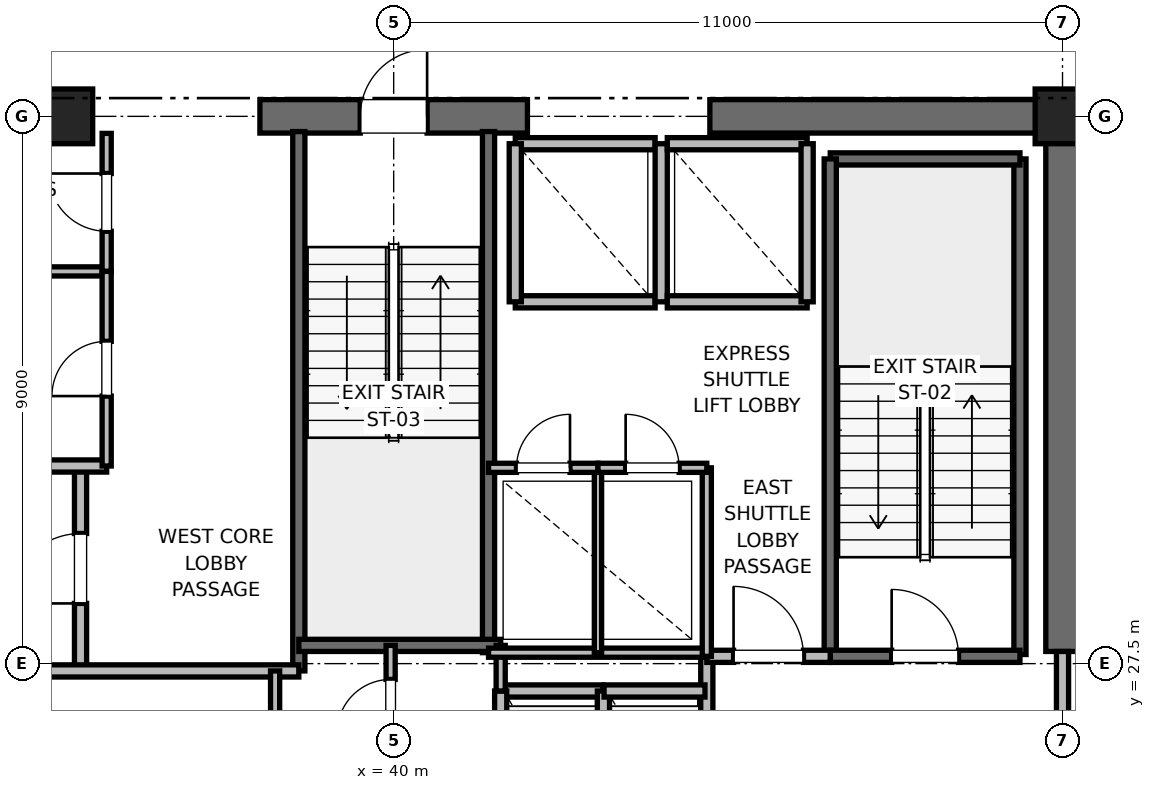
"""IFC4 building model, lengths in metres.
Left out: names, types, materials, properties, quantities, classifications, styles, units other than length and angle.
Written with IfcOpenShell. Run it as: python <this file> out.ifc"""

import sys

from ifc_helpers import new_model, si_unit, direction, frame, frame_2d, origin, origin_2d, place, context, subcontext, project, spatial, rectangle, extrude, element, fill, save


model = new_model("IFC4")
c1 = context("Model", 3, precision=1e-05, world=origin(), true_north=direction((0.0, 1.0)))
c2 = subcontext(c1, "Body", "Model", "MODEL_VIEW")
j1 = project(units=[si_unit("LENGTHUNIT", "METRE"), si_unit("PLANEANGLEUNIT", "RADIAN")], contexts=[c1])
p1 = place(None, origin())
s1 = spatial("IfcSite", under=j1, at=p1, CompositionType="ELEMENT")
p2 = place(p1, origin())
s2 = spatial("IfcBuilding", under=s1, at=p2, CompositionType="ELEMENT")
p3 = place(p2, frame((0.0, 0.0, 217.2)))
s3 = spatial("IfcBuildingStorey", under=s2, at=p3, CompositionType="ELEMENT", Elevation=217.2)
for number, where, z_axis, x_axis in (
    (1, (51.0, 36.5, 0.0), (0.0, 0.0, 1.0), (1.0, 0.0, 0.0)),
    (2, (34.6, 36.5, 0.0), (0.0, 0.0, 1.0), (1.0, 0.0, 0.0)),
):
    element("IfcColumn", number, at=place(p3, frame(where, z_axis=z_axis, x_axis=x_axis)), inside=s3, PredefinedType="PILASTER", context=c2, shape_type="SweptSolid", body=[
        extrude(rectangle(XDim=0.9, YDim=0.9, at=origin_2d()), origin(), (0.0, 0.0, 1.0), 4.0),
    ])
p4 = place(p3, frame((29.0, 36.5, 0.0), z_axis=(0.0, 0.0, 1.0), x_axis=(1.0, 0.0, 0.0)))
e3 = element("IfcWall", 3, at=p4, inside=s3, PredefinedType="SHEAR", context=c2, shape_type="SweptSolid", body=[
    extrude(rectangle(XDim=5.8, YDim=0.55, at=frame_2d((2.9, 0.0))), origin(), (0.0, 0.0, 1.0), 3.775),
])
p5 = place(p3, frame((37.8, 36.5, 0.0), z_axis=(0.0, 0.0, 1.0), x_axis=(1.0, 0.0, 0.0)))
e4 = element("IfcWall", 4, at=p5, inside=s3, PredefinedType="SHEAR", context=c2, shape_type="SweptSolid", body=[
    extrude(rectangle(XDim=4.4, YDim=0.55, at=frame_2d((2.2, 0.0))), origin(), (0.0, 0.0, 1.0), 3.775),
])
p6 = place(p5, frame((1.65, 0.0, 0.0)))
e5 = element("IfcOpeningElement", 5, at=p6, cuts=e4, PredefinedType="OPENING", context=c2, shape_type="SweptSolid", body=[
    extrude(rectangle(XDim=1.1, YDim=2.15, at=frame_2d((0.55, 1.075))), frame((0.0, 0.275, 0.0), z_axis=(0.0, -1.0, 0.0), x_axis=(1.0, 0.0, 0.0)), (0.0, 0.0, 1.0), 0.55),
])
p7 = place(p3, frame((45.2, 36.5, 0.0), z_axis=(0.0, 0.0, 1.0), x_axis=(1.0, 0.0, 0.0)))
e6 = element("IfcWall", 6, at=p7, inside=s3, PredefinedType="SHEAR", context=c2, shape_type="SweptSolid", body=[
    extrude(rectangle(XDim=5.8, YDim=0.55, at=frame_2d((2.9, 0.0))), origin(), (0.0, 0.0, 1.0), 3.775),
])
p8 = place(p3, frame((51.0, 27.7, 0.0), z_axis=(0.0, 0.0, 1.0), x_axis=(0.0, 1.0, 0.0)))
e7 = element("IfcWall", 7, at=p8, inside=s3, PredefinedType="SHEAR", context=c2, shape_type="SweptSolid", body=[
    extrude(rectangle(XDim=8.8, YDim=0.55, at=frame_2d((4.4, 0.0))), origin(), (0.0, 0.0, 1.0), 3.775),
])
p9 = place(p3, frame((50.3, 27.65, 0.0), z_axis=(0.0, 0.0, 1.0), x_axis=(0.0, 1.0, 0.0)))
e8 = element("IfcWall", 8, at=p9, inside=s3, PredefinedType="SOLIDWALL", context=c2, shape_type="SweptSolid", body=[
    extrude(rectangle(XDim=8.15, YDim=0.2, at=frame_2d((4.075, 0.0))), origin(), (0.0, 0.0, 1.0), 3.775),
])
p10 = place(p3, frame((47.18, 35.8, 0.0), z_axis=(0.0, 0.0, 1.0), x_axis=(1.0, 0.0, 0.0)))
e9 = element("IfcWall", 9, at=p10, inside=s3, PredefinedType="SOLIDWALL", context=c2, shape_type="SweptSolid", body=[
    extrude(rectangle(XDim=3.12, YDim=0.2, at=frame_2d((1.56, 0.0))), origin(), (0.0, 0.0, 1.0), 3.775),
])
p11 = place(p3, frame((47.18, 27.62, 0.0), z_axis=(0.0, 0.0, 1.0), x_axis=(0.0, 1.0, 0.0)))
e10 = element("IfcWall", 10, at=p11, inside=s3, PredefinedType="SOLIDWALL", context=c2, shape_type="SweptSolid", body=[
    extrude(rectangle(XDim=8.18, YDim=0.2, at=frame_2d((4.09, 0.0))), origin(), (0.0, 0.0, 1.0), 3.775),
])
p12 = place(p3, frame((47.18, 27.62, 0.0), z_axis=(0.0, 0.0, 1.0), x_axis=(1.0, 0.0, 0.0)))
e11 = element("IfcWall", 11, at=p12, inside=s3, PredefinedType="SOLIDWALL", context=c2, shape_type="SweptSolid", body=[
    extrude(rectangle(XDim=3.12, YDim=0.2, at=frame_2d((1.56, 0.0))), origin(), (0.0, 0.0, 1.0), 3.775),
])
p13 = place(p12, frame((1.01, 0.0, 0.0)))
e12 = element("IfcOpeningElement", 12, at=p13, cuts=e11, PredefinedType="OPENING", context=c2, shape_type="SweptSolid", body=[
    extrude(rectangle(XDim=1.1, YDim=2.15, at=frame_2d((0.55, 1.075))), frame((0.0, 0.1, 0.0), z_axis=(0.0, -1.0, 0.0), x_axis=(1.0, 0.0, 0.0)), (0.0, 0.0, 1.0), 0.2),
])
p14 = place(p3, frame((38.44, 27.38, 0.0), z_axis=(0.0, 0.0, 1.0), x_axis=(0.0, 1.0, 0.0)))
e13 = element("IfcWall", 13, at=p14, inside=s3, PredefinedType="SOLIDWALL", context=c2, shape_type="SweptSolid", body=[
    extrude(rectangle(XDim=8.87, YDim=0.2, at=frame_2d((4.435, 0.0))), origin(), (0.0, 0.0, 1.0), 3.775),
])
p15 = place(p3, frame((41.56, 27.68, 0.0), z_axis=(0.0, 0.0, 1.0), x_axis=(0.0, 1.0, 0.0)))
e14 = element("IfcWall", 14, at=p15, inside=s3, PredefinedType="SOLIDWALL", context=c2, shape_type="SweptSolid", body=[
    extrude(rectangle(XDim=8.57, YDim=0.2, at=frame_2d((4.285, 0.0))), origin(), (0.0, 0.0, 1.0), 3.775),
])
p16 = place(p3, frame((38.44, 27.8, 0.0), z_axis=(0.0, 0.0, 1.0), x_axis=(1.0, 0.0, 0.0)))
e15 = element("IfcWall", 15, at=p16, inside=s3, PredefinedType="SOLIDWALL", context=c2, shape_type="SweptSolid", body=[
    extrude(rectangle(XDim=3.32, YDim=0.2, at=frame_2d((1.66, 0.0))), origin(), (0.0, 0.0, 1.0), 3.775),
])
p17 = place(p3, frame((34.85, 27.38, 0.0), z_axis=(0.0, 0.0, 1.0), x_axis=(0.0, 1.0, 0.0)))
e16 = element("IfcWall", 16, at=p17, inside=s3, PredefinedType="PARTITIONING", context=c2, shape_type="SweptSolid", body=[
    extrude(rectangle(XDim=3.37, YDim=0.2, at=frame_2d((1.685, 0.0))), origin(), (0.0, 0.0, 1.0), 3.775),
])
p18 = place(p17, frame((1.11, 0.0, 0.0)))
e17 = element("IfcOpeningElement", 17, at=p18, cuts=e16, PredefinedType="OPENING", context=c2, shape_type="SweptSolid", body=[
    extrude(rectangle(XDim=1.15, YDim=2.2, at=frame_2d((0.575, 1.1))), frame((0.0, 0.1, 0.0), z_axis=(0.0, -1.0, 0.0), x_axis=(1.0, 0.0, 0.0)), (0.0, 0.0, 1.0), 0.2),
])
p19 = place(p3, frame((32.82, 27.38, 0.0), z_axis=(0.0, 0.0, 1.0), x_axis=(1.0, 0.0, 0.0)))
e18 = element("IfcWall", 18, at=p19, inside=s3, PredefinedType="PARTITIONING", context=c2, shape_type="SweptSolid", body=[
    extrude(rectangle(XDim=5.62, YDim=0.2, at=frame_2d((2.81, 0.0))), origin(), (0.0, 0.0, 1.0), 3.775),
])
p20 = place(p3, frame((32.15, 30.75, 0.0), z_axis=(0.0, 0.0, 1.0), x_axis=(1.0, 0.0, 0.0)))
e19 = element("IfcWall", 19, at=p20, inside=s3, PredefinedType="PARTITIONING", context=c2, shape_type="SweptSolid", body=[
    extrude(rectangle(XDim=3.13, YDim=0.2, at=frame_2d((1.565, 0.0))), origin(), (0.0, 0.0, 1.0), 3.775),
])
p21 = place(p3, frame((45.15, 24.25, 0.0), z_axis=(0.0, 0.0, 1.0), x_axis=(0.0, 1.0, 0.0)))
e20 = element("IfcWall", 20, at=p21, inside=s3, PredefinedType="PARTITIONING", context=c2, shape_type="SweptSolid", body=[
    extrude(rectangle(XDim=3.37, YDim=0.2, at=frame_2d((1.685, 0.0))), origin(), (0.0, 0.0, 1.0), 3.775),
])
p22 = place(p3, frame((45.15, 27.62, 0.0), z_axis=(0.0, 0.0, 1.0), x_axis=(1.0, 0.0, 0.0)))
e21 = element("IfcWall", 21, at=p22, inside=s3, PredefinedType="PARTITIONING", context=c2, shape_type="SweptSolid", body=[
    extrude(rectangle(XDim=2.03, YDim=0.2, at=frame_2d((1.015, 0.0))), origin(), (0.0, 0.0, 1.0), 3.775),
])
p23 = place(p22, frame((0.44, 0.0, 0.0)))
e22 = element("IfcOpeningElement", 22, at=p23, cuts=e21, PredefinedType="OPENING", context=c2, shape_type="SweptSolid", body=[
    extrude(rectangle(XDim=1.15, YDim=2.2, at=frame_2d((0.575, 1.1))), frame((0.0, 0.1, 0.0), z_axis=(0.0, -1.0, 0.0), x_axis=(1.0, 0.0, 0.0)), (0.0, 0.0, 1.0), 0.2),
])
p24 = place(p3, frame((51.0, 24.3, 0.0), z_axis=(0.0, 0.0, 1.0), x_axis=(0.0, 1.0, 0.0)))
e23 = element("IfcWall", 23, at=p24, inside=s3, PredefinedType="PARTITIONING", context=c2, shape_type="SweptSolid", body=[
    extrude(rectangle(XDim=3.4, YDim=0.2, at=frame_2d((1.7, 0.0))), origin(), (0.0, 0.0, 1.0), 2.755),
])
p25 = place(p24, frame((1.125, 0.0, 0.0)))
e24 = element("IfcOpeningElement", 24, at=p25, cuts=e23, PredefinedType="OPENING", context=c2, shape_type="SweptSolid", body=[
    extrude(rectangle(XDim=1.15, YDim=2.2, at=frame_2d((0.575, 1.1))), frame((0.0, 0.1, 0.0), z_axis=(0.0, -1.0, 0.0), x_axis=(1.0, 0.0, 0.0)), (0.0, 0.0, 1.0), 0.2),
])
p26 = place(p3, frame((43.44, 27.05, 0.0), z_axis=(0.0, 0.0, 1.0), x_axis=(-1.0, 0.0, 0.0)))
e25 = element("IfcWall", 25, at=p26, inside=s3, PredefinedType="SOLIDWALL", context=c2, shape_type="SweptSolid", body=[
    extrude(rectangle(XDim=1.68, YDim=0.2, at=frame_2d((0.84, 0.0))), origin(), (0.0, 0.0, 1.0), 3.775),
])
for number, where, z_axis, x_axis in (
    (26, (41.76, 27.05, 0.0), (0.0, 0.0, 1.0), (0.0, -1.0, 0.0)),
    (27, (43.45, 24.45, 0.0), (0.0, 0.0, 1.0), (0.0, 1.0, 0.0)),
):
    element("IfcWall", number, at=place(p3, frame(where, z_axis=z_axis, x_axis=x_axis)), inside=s3, PredefinedType="SOLIDWALL", context=c2, shape_type="SweptSolid", body=[
        extrude(rectangle(XDim=2.6, YDim=0.2, at=frame_2d((1.3, 0.0))), origin(), (0.0, 0.0, 1.0), 3.775),
    ])
p27 = place(p3, frame((45.12, 27.05, 0.0), z_axis=(0.0, 0.0, 1.0), x_axis=(-1.0, 0.0, 0.0)))
e28 = element("IfcWall", 28, at=p27, inside=s3, PredefinedType="SOLIDWALL", context=c2, shape_type="SweptSolid", body=[
    extrude(rectangle(XDim=1.66, YDim=0.2, at=frame_2d((0.83, 0.0))), origin(), (0.0, 0.0, 1.0), 3.775),
])
p28 = place(p3, frame((42.0, 33.45, 0.0), z_axis=(0.0, 0.0, 1.0), x_axis=(1.0, 0.0, 0.0)))
e29 = element("IfcWall", 29, at=p28, inside=s3, PredefinedType="SOLIDWALL", context=c2, shape_type="SweptSolid", body=[
    extrude(rectangle(XDim=2.3, YDim=0.2, at=frame_2d((1.15, 0.0))), origin(), (0.0, 0.0, 1.0), 3.775),
])
p29 = place(p3, frame((44.3, 36.05, 0.0), z_axis=(0.0, 0.0, 1.0), x_axis=(-1.0, 0.0, 0.0)))
e30 = element("IfcWall", 30, at=p29, inside=s3, PredefinedType="SOLIDWALL", context=c2, shape_type="SweptSolid", body=[
    extrude(rectangle(XDim=2.3, YDim=0.2, at=frame_2d((1.15, 0.0))), origin(), (0.0, 0.0, 1.0), 2.755),
])
for number, where, z_axis, x_axis in (
    (31, (42.0, 36.05, 0.0), (0.0, 0.0, 1.0), (0.0, -1.0, 0.0)),
    (32, (44.4, 33.45, 0.0), (0.0, 0.0, 1.0), (0.0, 1.0, 0.0)),
):
    element("IfcWall", number, at=place(p3, frame(where, z_axis=z_axis, x_axis=x_axis)), inside=s3, PredefinedType="SOLIDWALL", context=c2, shape_type="SweptSolid", body=[
        extrude(rectangle(XDim=2.6, YDim=0.2, at=frame_2d((1.3, 0.0))), origin(), (0.0, 0.0, 1.0), 2.755),
    ])
p30 = place(p3, frame((44.5, 33.45, 0.0), z_axis=(0.0, 0.0, 1.0), x_axis=(1.0, 0.0, 0.0)))
e33 = element("IfcWall", 33, at=p30, inside=s3, PredefinedType="SOLIDWALL", context=c2, shape_type="SweptSolid", body=[
    extrude(rectangle(XDim=2.3, YDim=0.2, at=frame_2d((1.15, 0.0))), origin(), (0.0, 0.0, 1.0), 3.775),
])
p31 = place(p3, frame((46.8, 36.05, 0.0), z_axis=(0.0, 0.0, 1.0), x_axis=(-1.0, 0.0, 0.0)))
e34 = element("IfcWall", 34, at=p31, inside=s3, PredefinedType="SOLIDWALL", context=c2, shape_type="SweptSolid", body=[
    extrude(rectangle(XDim=2.3, YDim=0.2, at=frame_2d((1.15, 0.0))), origin(), (0.0, 0.0, 1.0), 2.755),
])
p32 = place(p3, frame((46.8, 33.45, 0.0), z_axis=(0.0, 0.0, 1.0), x_axis=(0.0, 1.0, 0.0)))
e35 = element("IfcWall", 35, at=p32, inside=s3, PredefinedType="SOLIDWALL", context=c2, shape_type="SweptSolid", body=[
    extrude(rectangle(XDim=2.6, YDim=0.2, at=frame_2d((1.3, 0.0))), origin(), (0.0, 0.0, 1.0), 3.775),
])
p33 = place(p3, frame((41.76, 27.05, 0.0), z_axis=(0.0, 0.0, 1.0), x_axis=(0.0, 1.0, 0.0)))
e36 = element("IfcWall", 36, at=p33, inside=s3, PredefinedType="PARTITIONING", context=c2, shape_type="SweptSolid", body=[
    extrude(rectangle(XDim=0.75, YDim=0.15, at=frame_2d((0.375, 0.0))), origin(), (0.0, 0.0, 1.0), 2.85),
])
p34 = place(p3, frame((39.95, 25.8, 0.0), z_axis=(0.0, 0.0, 1.0), x_axis=(0.0, 1.0, 0.0)))
e37 = element("IfcWall", 37, at=p34, inside=s3, PredefinedType="PARTITIONING", context=c2, shape_type="SweptSolid", body=[
    extrude(rectangle(XDim=2.0, YDim=0.15, at=frame_2d((1.0, 0.0))), origin(), (0.0, 0.0, 1.0), 2.85),
])
p35 = place(p34, frame((0.56, 0.0, 0.0)))
e38 = element("IfcOpeningElement", 38, at=p35, cuts=e37, PredefinedType="OPENING", context=c2, shape_type="SweptSolid", body=[
    extrude(rectangle(XDim=0.88, YDim=2.1, at=frame_2d((0.44, 1.05))), frame((0.0, 0.075, 0.0), z_axis=(0.0, -1.0, 0.0), x_axis=(1.0, 0.0, 0.0)), (0.0, 0.0, 1.0), 0.15),
])
p36 = place(p3, frame((32.15, 33.95, 0.0), z_axis=(0.0, 0.0, 1.0), x_axis=(1.0, 0.0, 0.0)))
e39 = element("IfcWall", 39, at=p36, inside=s3, PredefinedType="PARTITIONING", context=c2, shape_type="SweptSolid", body=[
    extrude(rectangle(XDim=3.13, YDim=0.15, at=frame_2d((1.565, 0.0))), origin(), (0.0, 0.0, 1.0), 2.85),
])
p37 = place(p3, frame((35.28, 33.95, 0.0), z_axis=(0.0, 0.0, 1.0), x_axis=(0.0, 1.0, 0.0)))
e40 = element("IfcWall", 40, at=p37, inside=s3, PredefinedType="PARTITIONING", context=c2, shape_type="SweptSolid", body=[
    extrude(rectangle(XDim=2.27, YDim=0.15, at=frame_2d((1.135, 0.0))), origin(), (0.0, 0.0, 1.0), 2.755),
])
p38 = place(p37, frame((0.66, 0.0, 0.0)))
e41 = element("IfcOpeningElement", 41, at=p38, cuts=e40, PredefinedType="OPENING", context=c2, shape_type="SweptSolid", body=[
    extrude(rectangle(XDim=0.95, YDim=2.15, at=frame_2d((0.475, 1.075))), frame((0.0, 0.075, 0.0), z_axis=(0.0, -1.0, 0.0), x_axis=(1.0, 0.0, 0.0)), (0.0, 0.0, 1.0), 0.15),
])
p39 = place(p3, frame((35.28, 30.75, 0.0), z_axis=(0.0, 0.0, 1.0), x_axis=(0.0, 1.0, 0.0)))
e42 = element("IfcWall", 42, at=p39, inside=s3, PredefinedType="PARTITIONING", context=c2, shape_type="SweptSolid", body=[
    extrude(rectangle(XDim=3.2, YDim=0.15, at=frame_2d((1.6, 0.0))), origin(), (0.0, 0.0, 1.0), 2.85),
])
p40 = place(p39, frame((1.15, 0.0, 0.0)))
e43 = element("IfcOpeningElement", 43, at=p40, cuts=e42, PredefinedType="OPENING", context=c2, shape_type="SweptSolid", body=[
    extrude(rectangle(XDim=0.9, YDim=2.1, at=frame_2d((0.45, 1.05))), frame((0.0, 0.075, 0.0), z_axis=(0.0, -1.0, 0.0), x_axis=(1.0, 0.0, 0.0)), (0.0, 0.0, 1.0), 0.15),
])
p41 = place(p3, frame((38.05, 23.06, 0.0), z_axis=(0.0, 0.0, 1.0), x_axis=(0.0, 1.0, 0.0)))
e44 = element("IfcWall", 44, at=p41, inside=s3, PredefinedType="PARTITIONING", context=c2, shape_type="SweptSolid", body=[
    extrude(rectangle(XDim=4.32, YDim=0.15, at=frame_2d((2.16, 0.0))), origin(), (0.0, 0.0, 1.0), 2.85),
])
p42 = place(p41, frame((1.66, 0.0, 0.0)))
e45 = element("IfcOpeningElement", 45, at=p42, cuts=e44, PredefinedType="OPENING", context=c2, shape_type="SweptSolid", body=[
    extrude(rectangle(XDim=1.0, YDim=2.15, at=frame_2d((0.5, 1.075))), frame((0.0, 0.075, 0.0), z_axis=(0.0, -1.0, 0.0), x_axis=(1.0, 0.0, 0.0)), (0.0, 0.0, 1.0), 0.15),
])
p43 = place(p3, frame((41.56, 27.68, 0.0), z_axis=(0.0, 0.0, 1.0), x_axis=(1.0, 0.0, 0.0)))
e46 = element("IfcWall", 46, at=p43, inside=s3, PredefinedType="PARTITIONING", context=c2, shape_type="SweptSolid", body=[
    extrude(rectangle(XDim=3.59, YDim=0.15, at=frame_2d((1.795, 0.0))), origin(), (0.0, 0.0, 1.0), 2.85),
])
p44 = place(p3, frame((45.15, 27.62, 0.0), z_axis=(0.0, 0.0, 1.0), x_axis=(0.0, 1.0, 0.0)))
e47 = element("IfcWall", 47, at=p44, inside=s3, PredefinedType="PARTITIONING", context=c2, shape_type="SweptSolid", body=[
    extrude(rectangle(XDim=3.1, YDim=0.15, at=frame_2d((1.55, 0.0))), origin(), (0.0, 0.0, 1.0), 2.85),
])
p45 = place(p3, frame((43.36, 27.68, 0.0), z_axis=(0.0, 0.0, 1.0), x_axis=(0.0, 1.0, 0.0)))
e48 = element("IfcWall", 48, at=p45, inside=s3, PredefinedType="PARTITIONING", context=c2, shape_type="SweptSolid", body=[
    extrude(rectangle(XDim=3.04, YDim=0.12, at=frame_2d((1.52, 0.0))), origin(), (0.0, 0.0, 1.0), 2.85),
])
p46 = place(p3, frame((41.56, 30.72, 0.0), z_axis=(0.0, 0.0, 1.0), x_axis=(1.0, 0.0, 0.0)))
e49 = element("IfcWall", 49, at=p46, inside=s3, PredefinedType="PARTITIONING", context=c2, shape_type="SweptSolid", body=[
    extrude(rectangle(XDim=1.8, YDim=0.15, at=frame_2d((0.9, 0.0))), origin(), (0.0, 0.0, 1.0), 2.85),
])
p47 = place(p46, frame((0.46, 0.0, 0.0)))
e50 = element("IfcOpeningElement", 50, at=p47, cuts=e49, PredefinedType="OPENING", context=c2, shape_type="SweptSolid", body=[
    extrude(rectangle(XDim=0.88, YDim=2.1, at=frame_2d((0.44, 1.05))), frame((0.0, 0.075, 0.0), z_axis=(0.0, -1.0, 0.0), x_axis=(1.0, 0.0, 0.0)), (0.0, 0.0, 1.0), 0.15),
])
p48 = place(p3, frame((43.36, 30.72, 0.0), z_axis=(0.0, 0.0, 1.0), x_axis=(1.0, 0.0, 0.0)))
e51 = element("IfcWall", 51, at=p48, inside=s3, PredefinedType="PARTITIONING", context=c2, shape_type="SweptSolid", body=[
    extrude(rectangle(XDim=1.79, YDim=0.15, at=frame_2d((0.895, 0.0))), origin(), (0.0, 0.0, 1.0), 2.85),
])
p49 = place(p48, frame((0.455, 0.0, 0.0)))
e52 = element("IfcOpeningElement", 52, at=p49, cuts=e51, PredefinedType="OPENING", context=c2, shape_type="SweptSolid", body=[
    extrude(rectangle(XDim=0.88, YDim=2.1, at=frame_2d((0.44, 1.05))), frame((0.0, 0.075, 0.0), z_axis=(0.0, -1.0, 0.0), x_axis=(1.0, 0.0, 0.0)), (0.0, 0.0, 1.0), 0.15),
])
p50 = place(p13, origin())
e53 = element("IfcDoor", 53, at=p50, inside=s3, OperationType="SINGLE_SWING_LEFT", PredefinedType="DOOR", context=c2, shape_type="SweptSolid", body=[
    extrude(rectangle(XDim=1.1, YDim=2.15, at=frame_2d((0.55, 1.075))), frame((0.0, 0.025, 0.0), z_axis=(0.0, -1.0, 0.0), x_axis=(1.0, 0.0, 0.0)), (0.0, 0.0, 1.0), 0.05),
])
fill(e12, e53)
p51 = place(p6, origin())
e54 = element("IfcDoor", 54, at=p51, inside=s3, OperationType="SINGLE_SWING_RIGHT", PredefinedType="DOOR", context=c2, shape_type="SweptSolid", body=[
    extrude(rectangle(XDim=1.1, YDim=2.15, at=frame_2d((0.55, 1.075))), frame((0.0, 0.025, 0.0), z_axis=(0.0, -1.0, 0.0), x_axis=(1.0, 0.0, 0.0)), (0.0, 0.0, 1.0), 0.05),
])
fill(e5, e54)
p52 = place(p18, origin())
e55 = element("IfcDoor", 55, at=p52, inside=s3, OperationType="SINGLE_SWING_LEFT", PredefinedType="DOOR", context=c2, shape_type="SweptSolid", body=[
    extrude(rectangle(XDim=1.15, YDim=2.2, at=frame_2d((0.575, 1.1))), frame((0.0, 0.025, 0.0), z_axis=(0.0, -1.0, 0.0), x_axis=(1.0, 0.0, 0.0)), (0.0, 0.0, 1.0), 0.05),
])
fill(e17, e55)
p53 = place(p23, origin())
e56 = element("IfcDoor", 56, at=p53, inside=s3, OperationType="SINGLE_SWING_LEFT", PredefinedType="DOOR", context=c2, shape_type="SweptSolid", body=[
    extrude(rectangle(XDim=1.15, YDim=2.2, at=frame_2d((0.575, 1.1))), frame((0.0, 0.025, 0.0), z_axis=(0.0, -1.0, 0.0), x_axis=(1.0, 0.0, 0.0)), (0.0, 0.0, 1.0), 0.05),
])
fill(e22, e56)
p54 = place(p35, origin())
e57 = element("IfcDoor", 57, at=p54, inside=s3, OperationType="SINGLE_SWING_LEFT", PredefinedType="DOOR", context=c2, shape_type="SweptSolid", body=[
    extrude(rectangle(XDim=0.88, YDim=2.1, at=frame_2d((0.44, 1.05))), frame((0.0, 0.025, 0.0), z_axis=(0.0, -1.0, 0.0), x_axis=(1.0, 0.0, 0.0)), (0.0, 0.0, 1.0), 0.05),
])
fill(e38, e57)
p55 = place(p38, origin())
e58 = element("IfcDoor", 58, at=p55, inside=s3, OperationType="SINGLE_SWING_RIGHT", PredefinedType="DOOR", context=c2, shape_type="SweptSolid", body=[
    extrude(rectangle(XDim=0.95, YDim=2.15, at=frame_2d((0.475, 1.075))), frame((0.0, 0.025, 0.0), z_axis=(0.0, -1.0, 0.0), x_axis=(1.0, 0.0, 0.0)), (0.0, 0.0, 1.0), 0.05),
])
fill(e41, e58)
p56 = place(p40, origin())
e59 = element("IfcDoor", 59, at=p56, inside=s3, OperationType="SINGLE_SWING_LEFT", PredefinedType="DOOR", context=c2, shape_type="SweptSolid", body=[
    extrude(rectangle(XDim=0.9, YDim=2.1, at=frame_2d((0.45, 1.05))), frame((0.0, 0.025, 0.0), z_axis=(0.0, -1.0, 0.0), x_axis=(1.0, 0.0, 0.0)), (0.0, 0.0, 1.0), 0.05),
])
fill(e43, e59)
p57 = place(p47, origin())
e60 = element("IfcDoor", 60, at=p57, inside=s3, OperationType="SINGLE_SWING_RIGHT", PredefinedType="DOOR", context=c2, shape_type="SweptSolid", body=[
    extrude(rectangle(XDim=0.88, YDim=2.1, at=frame_2d((0.44, 1.05))), frame((0.0, 0.025, 0.0), z_axis=(0.0, -1.0, 0.0), x_axis=(1.0, 0.0, 0.0)), (0.0, 0.0, 1.0), 0.05),
])
fill(e50, e60)
p58 = place(p49, origin())
e61 = element("IfcDoor", 61, at=p58, inside=s3, OperationType="SINGLE_SWING_LEFT", PredefinedType="DOOR", context=c2, shape_type="SweptSolid", body=[
    extrude(rectangle(XDim=0.88, YDim=2.1, at=frame_2d((0.44, 1.05))), frame((0.0, 0.025, 0.0), z_axis=(0.0, -1.0, 0.0), x_axis=(1.0, 0.0, 0.0)), (0.0, 0.0, 1.0), 0.05),
])
fill(e52, e61)
save(model, sys.argv[1])
